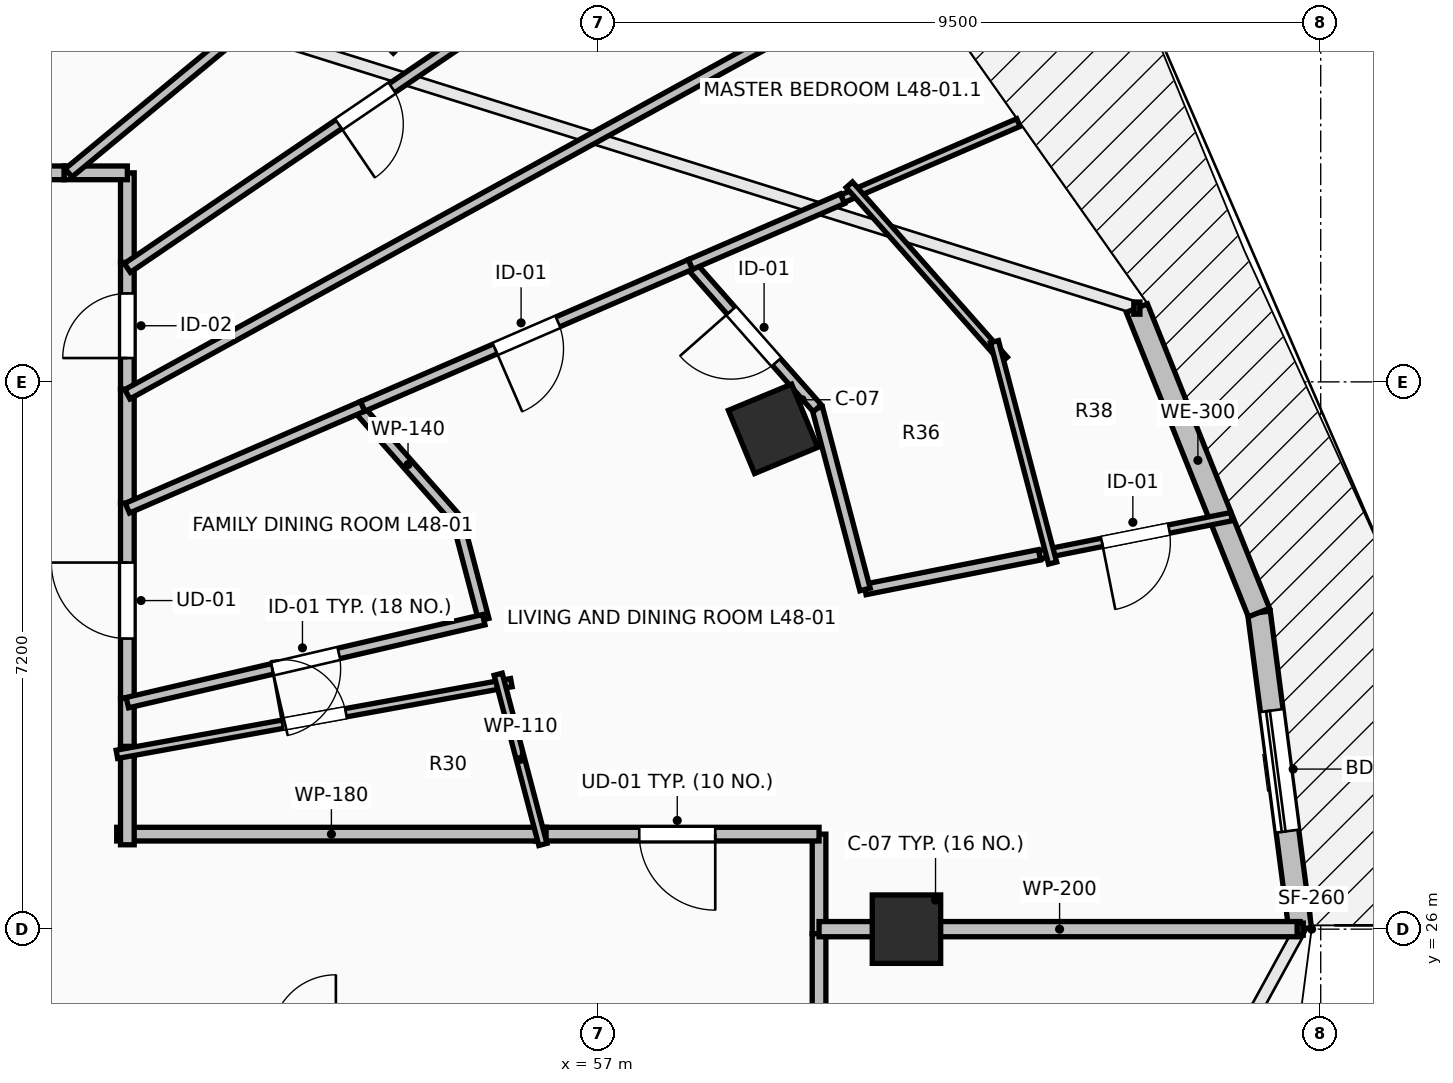
"""IFC4 building model, lengths in metres.
Left out: names, types, materials, properties, quantities, classifications, styles, units other than length and angle.
Written with IfcOpenShell. Run it as: python <this file> out.ifc"""

import sys

from ifc_helpers import new_model, si_unit, direction, frame, frame_2d, origin, origin_2d, place, context, subcontext, project, spatial, rectangle, extrude, element, fill, save


model = new_model("IFC4")
c1 = context("Model", 3, precision=1e-05, world=origin(), true_north=direction((0.0, 1.0)))
c2 = subcontext(c1, "Body", "Model", "MODEL_VIEW")
j1 = project(units=[si_unit("LENGTHUNIT", "METRE"), si_unit("PLANEANGLEUNIT", "RADIAN")], contexts=[c1])
p1 = place(None, origin())
s1 = spatial("IfcSite", under=j1, at=p1, CompositionType="ELEMENT")
p2 = place(p1, origin())
s2 = spatial("IfcBuilding", under=s1, at=p2, CompositionType="ELEMENT")
p3 = place(p2, frame((0.0, 0.0, 179.1)))
s3 = spatial("IfcBuildingStorey", under=s2, at=p3, CompositionType="ELEMENT", Elevation=179.1)
for number, where, z_axis, x_axis in (
    (1, (61.05, 26.0, 0.0), (0.0, 0.0, 1.0), (1.0, 0.0, 0.0)),
    (2, (59.295, 32.582, 0.0), (0.0, 0.0, 1.0), (0.924, 0.383, 0.0)),
    (3, (54.299, 38.162, 0.0), (0.0, 0.0, 1.0), (0.707, 0.707, 0.0)),
):
    element("IfcColumn", number, at=place(p3, frame(where, z_axis=z_axis, x_axis=x_axis)), inside=s3, PredefinedType="COLUMN", context=c2, shape_type="SweptSolid", body=[
        extrude(rectangle(XDim=0.9, YDim=0.9, at=origin_2d()), origin(), (0.0, 0.0, 1.0), 3.5),
    ])
p4 = place(p3, frame((66.23, 26.0, 0.0), z_axis=(0.0, 0.0, 1.0), x_axis=(-0.129147853268, 0.991625348605, 0.0)))
e4 = element("IfcWall", 4, at=p4, inside=s3, PredefinedType="STANDARD", context=c2, shape_type="SweptSolid", body=[
    extrude(rectangle(XDim=4.2, YDim=0.3, at=frame_2d((2.1, 0.0))), origin(), (0.0, 0.0, 1.0), 3.24),
])
p5 = place(p4, frame((1.3, 0.0, 0.0)))
e5 = element("IfcOpeningElement", 5, at=p5, cuts=e4, PredefinedType="OPENING", context=c2, shape_type="SweptSolid", body=[
    extrude(rectangle(XDim=1.6, YDim=2.3, at=frame_2d((0.8, 1.15))), frame((0.0, 0.165, 0.0), z_axis=(0.0, -1.0, 0.0), x_axis=(1.0, 0.0, 0.0)), (0.0, 0.0, 1.0), 0.33),
])
p6 = place(p3, frame((65.688, 30.165, 0.0), z_axis=(0.0, 0.0, 1.0), x_axis=(-0.372268409848, 0.928125116043, 0.0)))
e6 = element("IfcWall", 6, at=p6, inside=s3, PredefinedType="STANDARD", context=c2, shape_type="SweptSolid", body=[
    extrude(rectangle(XDim=4.315, YDim=0.3, at=frame_2d((2.158, 0.0))), origin(), (0.0, 0.0, 1.0), 3.24),
])
p7 = place(p3, frame((59.9, 25.94, 0.0), z_axis=(0.0, 0.0, 1.0), x_axis=(0.0, 1.0, 0.0)))
e7 = element("IfcWall", 7, at=p7, inside=s3, PredefinedType="PARTITIONING", context=c2, shape_type="SweptSolid", body=[
    extrude(rectangle(XDim=1.31, YDim=0.18, at=frame_2d((0.655, 0.0))), origin(), (0.0, 0.0, 1.0), 2.432),
])
p8 = place(p3, frame((59.9, 27.25, 0.0), z_axis=(0.0, 0.0, 1.0), x_axis=(-1.0, 0.0, 0.0)))
e8 = element("IfcWall", 8, at=p8, inside=s3, PredefinedType="PARTITIONING", context=c2, shape_type="SweptSolid", body=[
    extrude(rectangle(XDim=3.731, YDim=0.18, at=frame_2d((1.865, 0.0))), origin(), (0.0, 0.0, 1.0), 2.874),
])
p9 = place(p8, frame((1.365, 0.0, 0.0)))
e9 = element("IfcOpeningElement", 9, at=p9, cuts=e8, PredefinedType="OPENING", context=c2, shape_type="SweptSolid", body=[
    extrude(rectangle(XDim=1.0, YDim=2.15, at=frame_2d((0.5, 1.075))), frame((0.0, 0.105, 0.0), z_axis=(0.0, -1.0, 0.0), x_axis=(1.0, 0.0, 0.0)), (0.0, 0.0, 1.0), 0.21),
])
p10 = place(p3, frame((50.8, 28.265, 0.0), z_axis=(0.0, 0.0, 1.0), x_axis=(0.0, 1.0, 0.0)))
e10 = element("IfcWall", 10, at=p10, inside=s3, PredefinedType="PARTITIONING", context=c2, shape_type="SweptSolid", body=[
    extrude(rectangle(XDim=0.777, YDim=0.18, at=frame_2d((0.389, 0.0))), origin(), (0.0, 0.0, 1.0), 3.24),
])
p11 = place(p3, frame((50.8, 29.042, 0.0), z_axis=(0.0, 0.0, 1.0), x_axis=(0.0, 1.0, 0.0)))
e11 = element("IfcWall", 11, at=p11, inside=s3, PredefinedType="PARTITIONING", context=c2, shape_type="SweptSolid", body=[
    extrude(rectangle(XDim=2.562, YDim=0.18, at=frame_2d((1.281, 0.0))), origin(), (0.0, 0.0, 1.0), 3.24),
])
p12 = place(p11, frame((0.781, 0.0, 0.0)))
e12 = element("IfcOpeningElement", 12, at=p12, cuts=e11, PredefinedType="OPENING", context=c2, shape_type="SweptSolid", body=[
    extrude(rectangle(XDim=1.0, YDim=2.15, at=frame_2d((0.5, 1.075))), frame((0.0, 0.105, 0.0), z_axis=(0.0, -1.0, 0.0), x_axis=(1.0, 0.0, 0.0)), (0.0, 0.0, 1.0), 0.21),
])
p13 = place(p3, frame((56.309, 27.25, 0.0), z_axis=(0.0, 0.0, 1.0), x_axis=(-1.0, 0.0, 0.0)))
e13 = element("IfcWall", 13, at=p13, inside=s3, PredefinedType="PARTITIONING", context=c2, shape_type="SweptSolid", body=[
    extrude(rectangle(XDim=5.649, YDim=0.18, at=frame_2d((2.825, 0.0))), origin(), (0.0, 0.0, 1.0), 2.432),
])
p14 = place(p3, frame((50.8, 27.11, 0.0), z_axis=(0.0, 0.0, 1.0), x_axis=(0.0, 1.0, 0.0)))
e14 = element("IfcWall", 14, at=p14, inside=s3, PredefinedType="PARTITIONING", context=c2, shape_type="SweptSolid", body=[
    extrude(rectangle(XDim=1.295, YDim=0.18, at=frame_2d((0.647, 0.0))), origin(), (0.0, 0.0, 1.0), 2.432),
])
p15 = place(p3, frame((50.8, 31.604, 0.0), z_axis=(0.0, 0.0, 1.0), x_axis=(0.0, 1.0, 0.0)))
e15 = element("IfcWall", 15, at=p15, inside=s3, PredefinedType="PARTITIONING", context=c2, shape_type="SweptSolid", body=[
    extrude(rectangle(XDim=1.501, YDim=0.18, at=frame_2d((0.75, 0.0))), origin(), (0.0, 0.0, 1.0), 2.432),
])
p16 = place(p3, frame((50.8, 33.105, 0.0), z_axis=(0.0, 0.0, 1.0), x_axis=(0.0, 1.0, 0.0)))
e16 = element("IfcWall", 16, at=p16, inside=s3, PredefinedType="PARTITIONING", context=c2, shape_type="SweptSolid", body=[
    extrude(rectangle(XDim=1.667, YDim=0.18, at=frame_2d((0.833, 0.0))), origin(), (0.0, 0.0, 1.0), 2.432),
])
p17 = place(p16, frame((0.408, 0.0, 0.0)))
e17 = element("IfcOpeningElement", 17, at=p17, cuts=e16, PredefinedType="OPENING", context=c2, shape_type="SweptSolid", body=[
    extrude(rectangle(XDim=0.85, YDim=2.1, at=frame_2d((0.425, 1.05))), frame((0.0, 0.105, 0.0), z_axis=(0.0, -1.0, 0.0), x_axis=(1.0, 0.0, 0.0)), (0.0, 0.0, 1.0), 0.21),
])
p18 = place(p3, frame((50.8, 34.772, 0.0), z_axis=(0.0, 0.0, 1.0), x_axis=(0.0, 1.0, 0.0)))
e18 = element("IfcWall", 18, at=p18, inside=s3, PredefinedType="PARTITIONING", context=c2, shape_type="SweptSolid", body=[
    extrude(rectangle(XDim=1.178, YDim=0.18, at=frame_2d((0.589, 0.0))), origin(), (0.0, 0.0, 1.0), 2.432),
])
p19 = place(p3, frame((50.8, 35.95, 0.0), z_axis=(0.0, 0.0, 1.0), x_axis=(-1.0, 0.0, 0.0)))
e19 = element("IfcWall", 19, at=p19, inside=s3, PredefinedType="PARTITIONING", context=c2, shape_type="SweptSolid", body=[
    extrude(rectangle(XDim=0.833, YDim=0.18, at=frame_2d((0.417, 0.0))), origin(), (0.0, 0.0, 1.0), 3.24),
])
p20 = place(p3, frame((49.967, 35.95, 0.0), z_axis=(0.0, 0.0, 1.0), x_axis=(-1.0, 0.0, 0.0)))
e20 = element("IfcWall", 20, at=p20, inside=s3, PredefinedType="PARTITIONING", context=c2, shape_type="SweptSolid", body=[
    extrude(rectangle(XDim=2.077, YDim=0.18, at=frame_2d((1.039, 0.0))), origin(), (0.0, 0.0, 1.0), 2.432),
])
p21 = place(p20, frame((0.333, 0.0, 0.0)))
e21 = element("IfcOpeningElement", 21, at=p21, cuts=e20, PredefinedType="OPENING", context=c2, shape_type="SweptSolid", body=[
    extrude(rectangle(XDim=0.85, YDim=2.1, at=frame_2d((0.425, 1.05))), frame((0.0, 0.105, 0.0), z_axis=(0.0, -1.0, 0.0), x_axis=(1.0, 0.0, 0.0)), (0.0, 0.0, 1.0), 0.21),
])
p22 = place(p3, frame((59.9, 24.55, 0.0), z_axis=(0.0, 0.0, 1.0), x_axis=(0.0, 1.0, 0.0)))
e22 = element("IfcWall", 22, at=p22, inside=s3, PredefinedType="PARTITIONING", context=c2, shape_type="SweptSolid", body=[
    extrude(rectangle(XDim=1.39, YDim=0.18, at=frame_2d((0.695, 0.0))), origin(), (0.0, 0.0, 1.0), 2.432),
])
p23 = place(p3, frame((53.838, 32.853, 0.0), z_axis=(0.0, 0.0, 1.0), x_axis=(0.662046229388, -0.749463001191, 0.0)))
e23 = element("IfcWall", 23, at=p23, inside=s3, PredefinedType="PARTITIONING", context=c2, shape_type="SweptSolid", body=[
    extrude(rectangle(XDim=1.977, YDim=0.14, at=frame_2d((0.989, 0.0))), origin(), (0.0, 0.0, 1.0), 2.432),
])
p24 = place(p3, frame((55.147, 31.371, 0.0), z_axis=(0.0, 0.0, 1.0), x_axis=(0.25443966192, -0.967088650767, 0.0)))
e24 = element("IfcWall", 24, at=p24, inside=s3, PredefinedType="PARTITIONING", context=c2, shape_type="SweptSolid", body=[
    extrude(rectangle(XDim=1.344, YDim=0.14, at=frame_2d((0.672, 0.0))), origin(), (0.0, 0.0, 1.0), 3.24),
])
p25 = place(p3, frame((55.489, 30.071, 0.0), z_axis=(0.0, 0.0, 1.0), x_axis=(-0.973980178663, -0.226633209333, 0.0)))
e25 = element("IfcWall", 25, at=p25, inside=s3, PredefinedType="PARTITIONING", context=c2, shape_type="SweptSolid", body=[
    extrude(rectangle(XDim=4.814, YDim=0.14, at=frame_2d((2.407, 0.0))), origin(), (0.0, 0.0, 1.0), 2.922),
])
p26 = place(p25, frame((1.957, 0.0, 0.0)))
e26 = element("IfcOpeningElement", 26, at=p26, cuts=e25, PredefinedType="OPENING", context=c2, shape_type="SweptSolid", body=[
    extrude(rectangle(XDim=0.9, YDim=2.1, at=frame_2d((0.45, 1.05))), frame((0.0, 0.085, 0.0), z_axis=(0.0, -1.0, 0.0), x_axis=(1.0, 0.0, 0.0)), (0.0, 0.0, 1.0), 0.17),
])
p27 = place(p3, frame((53.896, 32.879, 0.0), z_axis=(0.0, 0.0, 1.0), x_axis=(-0.917742985146, -0.39717478925, 0.0)))
e27 = element("IfcWall", 27, at=p27, inside=s3, PredefinedType="PARTITIONING", context=c2, shape_type="SweptSolid", body=[
    extrude(rectangle(XDim=3.374, YDim=0.14, at=frame_2d((1.687, 0.0))), origin(), (0.0, 0.0, 1.0), 2.432),
])
p28 = place(p3, frame((50.662, 28.3, 0.0), z_axis=(0.0, 0.0, 1.0), x_axis=(0.983892120625, 0.178763237197, 0.0)))
e28 = element("IfcWall", 28, at=p28, inside=s3, PredefinedType="PARTITIONING", context=c2, shape_type="SweptSolid", body=[
    extrude(rectangle(XDim=5.274, YDim=0.11, at=frame_2d((2.637, 0.0))), origin(), (0.0, 0.0, 1.0), 2.874),
])
p29 = place(p28, frame((2.212, 0.0, 0.0)))
e29 = element("IfcOpeningElement", 29, at=p29, cuts=e28, PredefinedType="OPENING", context=c2, shape_type="SweptSolid", body=[
    extrude(rectangle(XDim=0.85, YDim=2.1, at=frame_2d((0.425, 1.05))), frame((0.0, 0.07, 0.0), z_axis=(0.0, -1.0, 0.0), x_axis=(1.0, 0.0, 0.0)), (0.0, 0.0, 1.0), 0.14),
])
p30 = place(p3, frame((55.678, 29.354, 0.0), z_axis=(0.0, 0.0, 1.0), x_axis=(0.254057219361, -0.96718919002, 0.0)))
e30 = element("IfcWall", 30, at=p30, inside=s3, PredefinedType="PARTITIONING", context=c2, shape_type="SweptSolid", body=[
    extrude(rectangle(XDim=2.315, YDim=0.11, at=frame_2d((1.157, 0.0))), origin(), (0.0, 0.0, 1.0), 2.432),
])
p31 = place(p3, frame((65.327, 31.427, 0.0), z_axis=(0.0, 0.0, 1.0), x_axis=(-0.980809558385, -0.194968228644, 0.0)))
e31 = element("IfcWall", 31, at=p31, inside=s3, PredefinedType="PARTITIONING", context=c2, shape_type="SweptSolid", body=[
    extrude(rectangle(XDim=2.577, YDim=0.11, at=frame_2d((1.289, 0.0))), origin(), (0.0, 0.0, 1.0), 3.24),
])
p32 = place(p31, frame((0.838, 0.0, 0.0)))
e32 = element("IfcOpeningElement", 32, at=p32, cuts=e31, PredefinedType="OPENING", context=c2, shape_type="SweptSolid", body=[
    extrude(rectangle(XDim=0.9, YDim=2.1, at=frame_2d((0.45, 1.05))), frame((0.0, 0.07, 0.0), z_axis=(0.0, -1.0, 0.0), x_axis=(1.0, 0.0, 0.0)), (0.0, 0.0, 1.0), 0.14),
])
p33 = place(p3, frame((60.208, 35.609, 0.0), z_axis=(0.0, 0.0, 1.0), x_axis=(0.917692098887, 0.397292350341, 0.0)))
e33 = element("IfcWall", 33, at=p33, inside=s3, PredefinedType="PARTITIONING", context=c2, shape_type="SweptSolid", body=[
    extrude(rectangle(XDim=2.522, YDim=0.11, at=frame_2d((1.261, 0.0))), origin(), (0.0, 0.0, 1.0), 3.24),
])
p34 = place(p3, frame((62.8, 30.925, 0.0), z_axis=(0.0, 0.0, 1.0), x_axis=(-0.980840670114, -0.194811652245, 0.0)))
e34 = element("IfcWall", 34, at=p34, inside=s3, PredefinedType="PARTITIONING", context=c2, shape_type="SweptSolid", body=[
    extrude(rectangle(XDim=2.34, YDim=0.14, at=frame_2d((1.17, 0.0))), origin(), (0.0, 0.0, 1.0), 3.24),
])
p35 = place(p3, frame((60.505, 30.469, 0.0), z_axis=(0.0, 0.0, 1.0), x_axis=(-0.254702896388, 0.967019355841, 0.0)))
e35 = element("IfcWall", 35, at=p35, inside=s3, PredefinedType="PARTITIONING", context=c2, shape_type="SweptSolid", body=[
    extrude(rectangle(XDim=2.465, YDim=0.14, at=frame_2d((1.233, 0.0))), origin(), (0.0, 0.0, 1.0), 3.24),
])
p36 = place(p3, frame((59.877, 32.853, 0.0), z_axis=(0.0, 0.0, 1.0), x_axis=(-0.661957655691, 0.749541234404, 0.0)))
e36 = element("IfcWall", 36, at=p36, inside=s3, PredefinedType="PARTITIONING", context=c2, shape_type="SweptSolid", body=[
    extrude(rectangle(XDim=2.523, YDim=0.14, at=frame_2d((1.261, 0.0))), origin(), (0.0, 0.0, 1.0), 3.24),
])
p37 = place(p36, frame((0.811, 0.0, 0.0)))
e37 = element("IfcOpeningElement", 37, at=p37, cuts=e36, PredefinedType="OPENING", context=c2, shape_type="SweptSolid", body=[
    extrude(rectangle(XDim=0.9, YDim=2.1, at=frame_2d((0.45, 1.05))), frame((0.0, 0.085, 0.0), z_axis=(0.0, -1.0, 0.0), x_axis=(1.0, 0.0, 0.0)), (0.0, 0.0, 1.0), 0.17),
])
p38 = place(p3, frame((58.207, 34.744, 0.0), z_axis=(0.0, 0.0, 1.0), x_axis=(0.917748928086, 0.397161056748, 0.0)))
e38 = element("IfcWall", 38, at=p38, inside=s3, PredefinedType="PARTITIONING", context=c2, shape_type="SweptSolid", body=[
    extrude(rectangle(XDim=2.18, YDim=0.14, at=frame_2d((1.09, 0.0))), origin(), (0.0, 0.0, 1.0), 3.24),
])
p39 = place(p3, frame((58.207, 34.744, 0.0), z_axis=(0.0, 0.0, 1.0), x_axis=(-0.917771035239, -0.397109968241, 0.0)))
e39 = element("IfcWall", 39, at=p39, inside=s3, PredefinedType="PARTITIONING", context=c2, shape_type="SweptSolid", body=[
    extrude(rectangle(XDim=4.697, YDim=0.14, at=frame_2d((2.349, 0.0))), origin(), (0.0, 0.0, 1.0), 2.432),
])
p40 = place(p39, frame((1.898, 0.0, 0.0)))
e40 = element("IfcOpeningElement", 40, at=p40, cuts=e39, PredefinedType="OPENING", context=c2, shape_type="SweptSolid", body=[
    extrude(rectangle(XDim=0.9, YDim=2.1, at=frame_2d((0.45, 1.05))), frame((0.0, 0.085, 0.0), z_axis=(0.0, -1.0, 0.0), x_axis=(1.0, 0.0, 0.0)), (0.0, 0.0, 1.0), 0.17),
])
p41 = place(p3, frame((59.9, 26.0, 0.0), z_axis=(0.0, 0.0, 1.0), x_axis=(1.0, 0.0, 0.0)))
e41 = element("IfcWall", 41, at=p41, inside=s3, PredefinedType="PARTITIONING", context=c2, shape_type="SweptSolid", body=[
    extrude(rectangle(XDim=6.329, YDim=0.2, at=frame_2d((3.165, 0.0))), origin(), (0.0, 0.0, 1.0), 2.432),
])
p42 = place(p3, frame((60.298, 35.794, 0.0), z_axis=(0.0, 0.0, 1.0), x_axis=(0.662277588726, -0.74925856383, 0.0)))
e42 = element("IfcWall", 42, at=p42, inside=s3, PredefinedType="PARTITIONING", context=c2, shape_type="SweptSolid", body=[
    extrude(rectangle(XDim=3.076, YDim=0.11, at=frame_2d((1.538, 0.0))), origin(), (0.0, 0.0, 1.0), 3.24),
])
p43 = place(p3, frame((62.208, 33.729, 0.0), z_axis=(0.0, 0.0, 1.0), x_axis=(0.254058335644, -0.967188896798, 0.0)))
e43 = element("IfcWall", 43, at=p43, inside=s3, PredefinedType="PARTITIONING", context=c2, shape_type="SweptSolid", body=[
    extrude(rectangle(XDim=3.012, YDim=0.11, at=frame_2d((1.506, 0.0))), origin(), (0.0, 0.0, 1.0), 3.24),
])
p44 = place(p3, frame((60.761, 38.513, 0.0), z_axis=(0.0, 0.0, 1.0), x_axis=(-0.876315654865, -0.481737348602, 0.0)))
e44 = element("IfcWall", 44, at=p44, inside=s3, PredefinedType="PARTITIONING", context=c2, shape_type="SweptSolid", body=[
    extrude(rectangle(XDim=11.367, YDim=0.14, at=frame_2d((5.684, 0.0))), origin(), (0.0, 0.0, 1.0), 2.432),
])
p45 = place(p3, frame((58.917, 40.215, 0.0), z_axis=(0.0, 0.0, 1.0), x_axis=(-0.827087951184, -0.562072522906, 0.0)))
e45 = element("IfcWall", 45, at=p45, inside=s3, PredefinedType="PARTITIONING", context=c2, shape_type="SweptSolid", body=[
    extrude(rectangle(XDim=9.814, YDim=0.14, at=frame_2d((4.907, 0.0))), origin(), (0.0, 0.0, 1.0), 2.432),
])
p46 = place(p45, frame((5.602, 0.0, 0.0)))
e46 = element("IfcOpeningElement", 46, at=p46, cuts=e45, PredefinedType="OPENING", context=c2, shape_type="SweptSolid", body=[
    extrude(rectangle(XDim=0.85, YDim=2.1, at=frame_2d((0.425, 1.05))), frame((0.0, 0.085, 0.0), z_axis=(0.0, -1.0, 0.0), x_axis=(1.0, 0.0, 0.0)), (0.0, 0.0, 1.0), 0.17),
])
p47 = place(p3, frame((56.98, 41.702, 0.0), z_axis=(0.0, 0.0, 1.0), x_axis=(-0.770511618294, -0.637425953405, 0.0)))
e47 = element("IfcWall", 47, at=p47, inside=s3, PredefinedType="PARTITIONING", context=c2, shape_type="SweptSolid", body=[
    extrude(rectangle(XDim=9.024, YDim=0.14, at=frame_2d((4.512, 0.0))), origin(), (0.0, 0.0, 1.0), 2.774),
])
p48 = place(p3, frame((54.959, 42.959, 0.0), z_axis=(0.0, 0.0, 1.0), x_axis=(-0.707106781187, -0.707106781187, 0.0)))
e48 = element("IfcWall", 48, at=p48, inside=s3, PredefinedType="PARTITIONING", context=c2, shape_type="SweptSolid", body=[
    extrude(rectangle(XDim=8.492, YDim=0.2, at=frame_2d((4.246, 0.0))), origin(), (0.0, 0.0, 1.0), 2.774),
])
p49 = place(p5, origin())
e49 = element("IfcDoor", 49, at=p49, inside=s3, OperationType="SLIDING_TO_LEFT", PredefinedType="DOOR", context=c2, shape_type="SweptSolid", body=[
    extrude(rectangle(XDim=1.6, YDim=2.3, at=frame_2d((0.8, 1.15))), frame((0.0, 0.025, 0.0), z_axis=(0.0, -1.0, 0.0), x_axis=(1.0, 0.0, 0.0)), (0.0, 0.0, 1.0), 0.05),
])
fill(e5, e49)
p50 = place(p9, origin())
e50 = element("IfcDoor", 50, at=p50, inside=s3, OperationType="SINGLE_SWING_LEFT", PredefinedType="DOOR", context=c2, shape_type="SweptSolid", body=[
    extrude(rectangle(XDim=1.0, YDim=2.15, at=frame_2d((0.5, 1.075))), frame((0.0, 0.025, 0.0), z_axis=(0.0, -1.0, 0.0), x_axis=(1.0, 0.0, 0.0)), (0.0, 0.0, 1.0), 0.05),
])
fill(e9, e50)
p51 = place(p12, origin())
e51 = element("IfcDoor", 51, at=p51, inside=s3, OperationType="SINGLE_SWING_RIGHT", PredefinedType="DOOR", context=c2, shape_type="SweptSolid", body=[
    extrude(rectangle(XDim=1.0, YDim=2.15, at=frame_2d((0.5, 1.075))), frame((0.0, 0.025, 0.0), z_axis=(0.0, -1.0, 0.0), x_axis=(1.0, 0.0, 0.0)), (0.0, 0.0, 1.0), 0.05),
])
fill(e12, e51)
p52 = place(p26, origin())
e52 = element("IfcDoor", 52, at=p52, inside=s3, OperationType="SINGLE_SWING_RIGHT", PredefinedType="DOOR", context=c2, shape_type="SweptSolid", body=[
    extrude(rectangle(XDim=0.9, YDim=2.1, at=frame_2d((0.45, 1.05))), frame((0.0, 0.025, 0.0), z_axis=(0.0, -1.0, 0.0), x_axis=(1.0, 0.0, 0.0)), (0.0, 0.0, 1.0), 0.05),
])
fill(e26, e52)
p53 = place(p29, origin())
e53 = element("IfcDoor", 53, at=p53, inside=s3, OperationType="SINGLE_SWING_LEFT", PredefinedType="DOOR", context=c2, shape_type="SweptSolid", body=[
    extrude(rectangle(XDim=0.85, YDim=2.1, at=frame_2d((0.425, 1.05))), frame((0.0, 0.025, 0.0), z_axis=(0.0, -1.0, 0.0), x_axis=(1.0, 0.0, 0.0)), (0.0, 0.0, 1.0), 0.05),
])
fill(e29, e53)
p54 = place(p32, origin())
e54 = element("IfcDoor", 54, at=p54, inside=s3, OperationType="SINGLE_SWING_RIGHT", PredefinedType="DOOR", context=c2, shape_type="SweptSolid", body=[
    extrude(rectangle(XDim=0.9, YDim=2.1, at=frame_2d((0.45, 1.05))), frame((0.0, 0.025, 0.0), z_axis=(0.0, -1.0, 0.0), x_axis=(1.0, 0.0, 0.0)), (0.0, 0.0, 1.0), 0.05),
])
fill(e32, e54)
p55 = place(p37, origin())
e55 = element("IfcDoor", 55, at=p55, inside=s3, OperationType="SINGLE_SWING_RIGHT", PredefinedType="DOOR", context=c2, shape_type="SweptSolid", body=[
    extrude(rectangle(XDim=0.9, YDim=2.1, at=frame_2d((0.45, 1.05))), frame((0.0, 0.025, 0.0), z_axis=(0.0, -1.0, 0.0), x_axis=(1.0, 0.0, 0.0)), (0.0, 0.0, 1.0), 0.05),
])
fill(e37, e55)
p56 = place(p40, origin())
e56 = element("IfcDoor", 56, at=p56, inside=s3, OperationType="SINGLE_SWING_RIGHT", PredefinedType="DOOR", context=c2, shape_type="SweptSolid", body=[
    extrude(rectangle(XDim=0.9, YDim=2.1, at=frame_2d((0.45, 1.05))), frame((0.0, 0.025, 0.0), z_axis=(0.0, -1.0, 0.0), x_axis=(1.0, 0.0, 0.0)), (0.0, 0.0, 1.0), 0.05),
])
fill(e40, e56)
p57 = place(p17, origin())
e57 = element("IfcDoor", 57, at=p57, inside=s3, OperationType="SINGLE_SWING_LEFT", PredefinedType="DOOR", context=c2, shape_type="SweptSolid", body=[
    extrude(rectangle(XDim=0.85, YDim=2.1, at=frame_2d((0.425, 1.05))), frame((0.0, 0.025, 0.0), z_axis=(0.0, -1.0, 0.0), x_axis=(1.0, 0.0, 0.0)), (0.0, 0.0, 1.0), 0.05),
])
fill(e17, e57)
p58 = place(p46, origin())
e58 = element("IfcDoor", 58, at=p58, inside=s3, OperationType="SINGLE_SWING_RIGHT", PredefinedType="DOOR", context=c2, shape_type="SweptSolid", body=[
    extrude(rectangle(XDim=0.85, YDim=2.1, at=frame_2d((0.425, 1.05))), frame((0.0, 0.025, 0.0), z_axis=(0.0, -1.0, 0.0), x_axis=(1.0, 0.0, 0.0)), (0.0, 0.0, 1.0), 0.05),
])
fill(e46, e58)
save(model, sys.argv[1])
